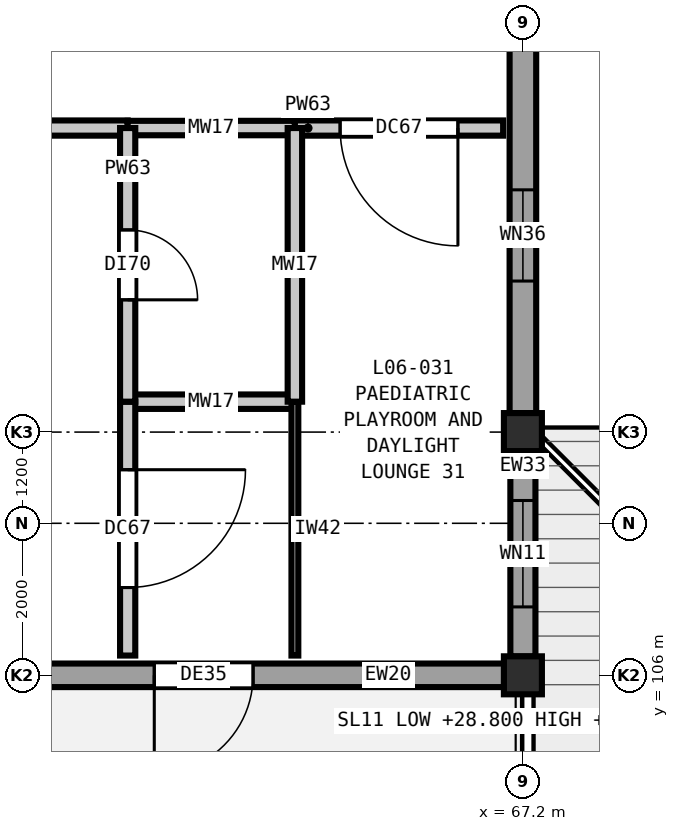
"""IFC4 building model, lengths in metres.
Left out: names, types, materials, properties, quantities, classifications, styles, units other than length and angle.
Written with IfcOpenShell. Run it as: python <this file> out.ifc"""

import sys

from ifc_helpers import new_model, si_unit, direction, frame, frame_2d, origin, origin_2d, place, context, subcontext, project, spatial, rectangle, extrude, element, fill, save


model = new_model("IFC4")
c1 = context("Model", 3, precision=1e-05, world=origin(), true_north=direction((0.0, 1.0)))
c2 = subcontext(c1, "Body", "Model", "MODEL_VIEW")
j1 = project(units=[si_unit("LENGTHUNIT", "METRE"), si_unit("PLANEANGLEUNIT", "RADIAN")], contexts=[c1])
p1 = place(None, origin())
s1 = spatial("IfcSite", under=j1, at=p1, CompositionType="ELEMENT")
p2 = place(p1, origin())
s2 = spatial("IfcBuilding", under=s1, at=p2, CompositionType="ELEMENT")
p3 = place(p2, frame((0.0, 0.0, 28.8)))
s3 = spatial("IfcBuildingStorey", under=s2, at=p3, CompositionType="ELEMENT", Elevation=28.8)
for number, where, z_axis, x_axis in (
    (1, (67.2, 106.0, 0.0), (0.0, 0.0, 1.0), (1.0, 0.0, 0.0)),
    (2, (67.2, 109.2, 0.0), (0.0, 0.0, 1.0), (1.0, 0.0, 0.0)),
):
    element("IfcColumn", number, at=place(p3, frame(where, z_axis=z_axis, x_axis=x_axis)), inside=s3, PredefinedType="COLUMN", context=c2, shape_type="SweptSolid", body=[
        extrude(rectangle(XDim=0.5, YDim=0.5, at=origin_2d()), origin(), (0.0, 0.0, 1.0), 4.2),
    ])
p4 = place(p3, frame((67.2, 116.152, 0.0), z_axis=(0.0, 0.0, 1.0), x_axis=(0.0, -1.0, 0.0)))
e3 = element("IfcWall", 3, at=p4, inside=s3, PredefinedType="SOLIDWALL", context=c2, shape_type="SweptSolid", body=[
    extrude(rectangle(XDim=6.704, YDim=0.35, at=frame_2d((3.352, 0.0))), origin(), (0.0, 0.0, 1.0), 3.48),
])
p5 = place(p4, frame((3.765, 0.0, 0.9)))
e4 = element("IfcOpeningElement", 4, at=p5, cuts=e3, PredefinedType="OPENING", context=c2, shape_type="SweptSolid", body=[
    extrude(rectangle(XDim=1.2, YDim=2.15, at=frame_2d((0.6, 1.075))), frame((0.0, 0.185, 0.0), z_axis=(0.0, -1.0, 0.0), x_axis=(1.0, 0.0, 0.0)), (0.0, 0.0, 1.0), 0.37),
])
p6 = place(p3, frame((67.2, 108.952, 0.0), z_axis=(0.0, 0.0, 1.0), x_axis=(0.0, -1.0, 0.0)))
e5 = element("IfcWall", 5, at=p6, inside=s3, PredefinedType="SOLIDWALL", context=c2, shape_type="SweptSolid", body=[
    extrude(rectangle(XDim=2.704, YDim=0.33, at=frame_2d((1.352, 0.0))), origin(), (0.0, 0.0, 1.0), 3.48),
])
p7 = place(p6, frame((0.652, 0.0, 0.9)))
e6 = element("IfcOpeningElement", 6, at=p7, cuts=e5, PredefinedType="OPENING", context=c2, shape_type="SweptSolid", body=[
    extrude(rectangle(XDim=1.4, YDim=2.15, at=frame_2d((0.7, 1.075))), frame((0.0, 0.175, 0.0), z_axis=(0.0, -1.0, 0.0), x_axis=(1.0, 0.0, 0.0)), (0.0, 0.0, 1.0), 0.35),
])
p8 = place(p3, frame((66.952, 106.0, 0.0), z_axis=(0.0, 0.0, 1.0), x_axis=(-1.0, 0.0, 0.0)))
e7 = element("IfcWall", 7, at=p8, inside=s3, PredefinedType="SOLIDWALL", context=c2, shape_type="SweptSolid", body=[
    extrude(rectangle(XDim=7.904, YDim=0.31, at=frame_2d((3.952, 0.0))), origin(), (0.0, 0.0, 1.0), 3.48),
])
p9 = place(p8, frame((3.302, 0.0, 0.0)))
e8 = element("IfcOpeningElement", 8, at=p9, cuts=e7, PredefinedType="OPENING", context=c2, shape_type="SweptSolid", body=[
    extrude(rectangle(XDim=1.3, YDim=2.15, at=frame_2d((0.65, 1.075))), frame((0.0, 0.165, 0.0), z_axis=(0.0, -1.0, 0.0), x_axis=(1.0, 0.0, 0.0)), (0.0, 0.0, 1.0), 0.33),
])
p10 = place(p3, frame((62.0, 109.6, 0.0), z_axis=(0.0, 0.0, 1.0), x_axis=(1.0, 0.0, 0.0)))
e9 = element("IfcWall", 9, at=p10, inside=s3, PredefinedType="PLUMBINGWALL", context=c2, shape_type="SweptSolid", body=[
    extrude(rectangle(XDim=2.2, YDim=0.19, at=frame_2d((1.1, 0.0))), origin(), (0.0, 0.0, 1.0), 3.92),
])
p11 = place(p3, frame((57.6, 113.2, 0.0), z_axis=(0.0, 0.0, 1.0), x_axis=(1.0, 0.0, 0.0)))
e10 = element("IfcWall", 10, at=p11, inside=s3, PredefinedType="PARTITIONING", context=c2, shape_type="SweptSolid", body=[
    extrude(rectangle(XDim=4.4, YDim=0.2, at=frame_2d((2.2, 0.0))), origin(), (0.0, 0.0, 1.0), 3.92),
])
p12 = place(p11, frame((1.475, 0.0, 0.0)))
e11 = element("IfcOpeningElement", 11, at=p12, cuts=e10, PredefinedType="OPENING", context=c2, shape_type="SweptSolid", body=[
    extrude(rectangle(XDim=1.45, YDim=2.25, at=frame_2d((0.725, 1.125))), frame((0.0, 0.11, 0.0), z_axis=(0.0, -1.0, 0.0), x_axis=(1.0, 0.0, 0.0)), (0.0, 0.0, 1.0), 0.22),
])
p13 = place(p3, frame((62.0, 113.2, 0.0), z_axis=(0.0, 0.0, 1.0), x_axis=(1.0, 0.0, 0.0)))
e12 = element("IfcWall", 12, at=p13, inside=s3, PredefinedType="PLUMBINGWALL", context=c2, shape_type="SweptSolid", body=[
    extrude(rectangle(XDim=2.2, YDim=0.19, at=frame_2d((1.1, 0.0))), origin(), (0.0, 0.0, 1.0), 3.92),
])
p14 = place(p3, frame((64.2, 113.2, 0.0), z_axis=(0.0, 0.0, 1.0), x_axis=(1.0, 0.0, 0.0)))
e13 = element("IfcWall", 13, at=p14, inside=s3, PredefinedType="PARTITIONING", context=c2, shape_type="SweptSolid", body=[
    extrude(rectangle(XDim=2.74, YDim=0.2, at=frame_2d((1.37, 0.0))), origin(), (0.0, 0.0, 1.0), 3.92),
])
p15 = place(p14, frame((0.595, 0.0, 0.0)))
e14 = element("IfcOpeningElement", 14, at=p15, cuts=e13, PredefinedType="OPENING", context=c2, shape_type="SweptSolid", body=[
    extrude(rectangle(XDim=1.55, YDim=2.25, at=frame_2d((0.775, 1.125))), frame((0.0, 0.11, 0.0), z_axis=(0.0, -1.0, 0.0), x_axis=(1.0, 0.0, 0.0)), (0.0, 0.0, 1.0), 0.22),
])
p16 = place(p3, frame((62.0, 106.26, 0.0), z_axis=(0.0, 0.0, 1.0), x_axis=(0.0, 1.0, 0.0)))
e15 = element("IfcWall", 15, at=p16, inside=s3, PredefinedType="PARTITIONING", context=c2, shape_type="SweptSolid", body=[
    extrude(rectangle(XDim=3.34, YDim=0.2, at=frame_2d((1.67, 0.0))), origin(), (0.0, 0.0, 1.0), 3.92),
])
p17 = place(p16, frame((0.895, 0.0, 0.0)))
e16 = element("IfcOpeningElement", 16, at=p17, cuts=e15, PredefinedType="OPENING", context=c2, shape_type="SweptSolid", body=[
    extrude(rectangle(XDim=1.55, YDim=2.25, at=frame_2d((0.775, 1.125))), frame((0.0, 0.11, 0.0), z_axis=(0.0, -1.0, 0.0), x_axis=(1.0, 0.0, 0.0)), (0.0, 0.0, 1.0), 0.22),
])
p18 = place(p3, frame((62.0, 109.6, 0.0), z_axis=(0.0, 0.0, 1.0), x_axis=(0.0, 1.0, 0.0)))
e17 = element("IfcWall", 17, at=p18, inside=s3, PredefinedType="PARTITIONING", context=c2, shape_type="SweptSolid", body=[
    extrude(rectangle(XDim=3.6, YDim=0.2, at=frame_2d((1.8, 0.0))), origin(), (0.0, 0.0, 1.0), 3.92),
])
p19 = place(p18, frame((1.34, 0.0, 0.0)))
e18 = element("IfcOpeningElement", 18, at=p19, cuts=e17, PredefinedType="OPENING", context=c2, shape_type="SweptSolid", body=[
    extrude(rectangle(XDim=0.92, YDim=2.1, at=frame_2d((0.46, 1.05))), frame((0.0, 0.11, 0.0), z_axis=(0.0, -1.0, 0.0), x_axis=(1.0, 0.0, 0.0)), (0.0, 0.0, 1.0), 0.22),
])
p20 = place(p3, frame((64.2, 106.26, 0.0), z_axis=(0.0, 0.0, 1.0), x_axis=(0.0, 1.0, 0.0)))
e19 = element("IfcWall", 19, at=p20, inside=s3, PredefinedType="PARTITIONING", context=c2, shape_type="SweptSolid", body=[
    extrude(rectangle(XDim=3.34, YDim=0.09, at=frame_2d((1.67, 0.0))), origin(), (0.0, 0.0, 1.0), 3.92),
])
p21 = place(p3, frame((64.2, 109.6, 0.0), z_axis=(0.0, 0.0, 1.0), x_axis=(0.0, 1.0, 0.0)))
e20 = element("IfcWall", 20, at=p21, inside=s3, PredefinedType="PLUMBINGWALL", context=c2, shape_type="SweptSolid", body=[
    extrude(rectangle(XDim=3.6, YDim=0.19, at=frame_2d((1.8, 0.0))), origin(), (0.0, 0.0, 1.0), 3.92),
])
p22 = place(p5, origin())
e21 = element("IfcWindow", 21, at=p22, inside=s3, PartitioningType="SINGLE_PANEL", PredefinedType="WINDOW", context=c2, shape_type="SweptSolid", body=[
    extrude(rectangle(XDim=1.2, YDim=2.15, at=frame_2d((0.6, 1.075))), frame((0.0, 0.03, 0.0), z_axis=(0.0, -1.0, 0.0), x_axis=(1.0, 0.0, 0.0)), (0.0, 0.0, 1.0), 0.06),
])
fill(e4, e21)
p23 = place(p7, origin())
e22 = element("IfcWindow", 22, at=p23, inside=s3, PartitioningType="SINGLE_PANEL", PredefinedType="WINDOW", context=c2, shape_type="SweptSolid", body=[
    extrude(rectangle(XDim=1.4, YDim=2.15, at=frame_2d((0.7, 1.075))), frame((0.0, 0.03, 0.0), z_axis=(0.0, -1.0, 0.0), x_axis=(1.0, 0.0, 0.0)), (0.0, 0.0, 1.0), 0.06),
])
fill(e6, e22)
p24 = place(p9, origin())
e23 = element("IfcDoor", 23, at=p24, inside=s3, OperationType="SINGLE_SWING_RIGHT", PredefinedType="DOOR", context=c2, shape_type="SweptSolid", body=[
    extrude(rectangle(XDim=1.3, YDim=2.15, at=frame_2d((0.65, 1.075))), frame((0.0, 0.025, 0.0), z_axis=(0.0, -1.0, 0.0), x_axis=(1.0, 0.0, 0.0)), (0.0, 0.0, 1.0), 0.05),
])
fill(e8, e23)
p25 = place(p15, frame((1.55, 0.0, 0.0), z_axis=(0.0, 0.0, 1.0), x_axis=(-1.0, 0.0, 0.0)))
e24 = element("IfcDoor", 24, at=p25, inside=s3, OperationType="SINGLE_SWING_LEFT", PredefinedType="DOOR", context=c2, shape_type="SweptSolid", body=[
    extrude(rectangle(XDim=1.55, YDim=2.25, at=frame_2d((0.775, 1.125))), frame((0.0, 0.025, 0.0), z_axis=(0.0, -1.0, 0.0), x_axis=(1.0, 0.0, 0.0)), (0.0, 0.0, 1.0), 0.05),
])
fill(e14, e24)
p26 = place(p17, frame((1.55, 0.0, 0.0), z_axis=(0.0, 0.0, 1.0), x_axis=(-1.0, 0.0, 0.0)))
e25 = element("IfcDoor", 25, at=p26, inside=s3, OperationType="SINGLE_SWING_LEFT", PredefinedType="DOOR", context=c2, shape_type="SweptSolid", body=[
    extrude(rectangle(XDim=1.55, YDim=2.25, at=frame_2d((0.775, 1.125))), frame((0.0, 0.025, 0.0), z_axis=(0.0, -1.0, 0.0), x_axis=(1.0, 0.0, 0.0)), (0.0, 0.0, 1.0), 0.05),
])
fill(e16, e25)
p27 = place(p19, frame((0.92, 0.0, 0.0), z_axis=(0.0, 0.0, 1.0), x_axis=(-1.0, 0.0, 0.0)))
e26 = element("IfcDoor", 26, at=p27, inside=s3, OperationType="SINGLE_SWING_RIGHT", PredefinedType="DOOR", context=c2, shape_type="SweptSolid", body=[
    extrude(rectangle(XDim=0.92, YDim=2.1, at=frame_2d((0.46, 1.05))), frame((0.0, 0.025, 0.0), z_axis=(0.0, -1.0, 0.0), x_axis=(1.0, 0.0, 0.0)), (0.0, 0.0, 1.0), 0.05),
])
fill(e18, e26)
save(model, sys.argv[1])
